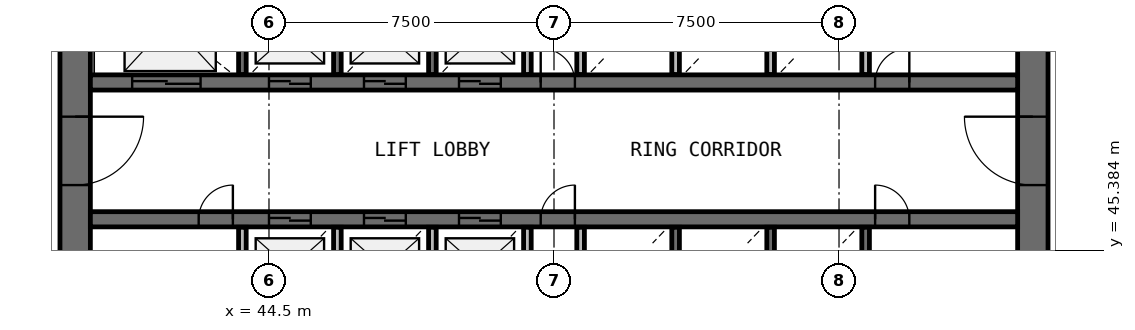
"""IFC4 building model, lengths in metres.
Left out: names, types, materials, properties, quantities, classifications, styles, units other than length and angle.
Written with IfcOpenShell. Run it as: python <this file> out.ifc"""

import sys

from ifc_helpers import new_model, si_unit, direction, frame, frame_2d, origin, place, context, subcontext, project, spatial, rectangle, extrude, source, transform, mapped, element, fill, save


model = new_model("IFC4")
c1 = context("Model", 3, precision=1e-05, world=origin(), true_north=direction((0.0, 1.0)))
c2 = subcontext(c1, "Body", "Model", "MODEL_VIEW")
j1 = project(units=[si_unit("LENGTHUNIT", "METRE"), si_unit("PLANEANGLEUNIT", "RADIAN")], contexts=[c1])
p1 = place(None, origin())
s1 = spatial("IfcSite", under=j1, at=p1, CompositionType="ELEMENT")
p2 = place(p1, origin())
s2 = spatial("IfcBuilding", under=s1, at=p2, CompositionType="ELEMENT")
p3 = place(p2, frame((0.0, 0.0, 108.5)))
s3 = spatial("IfcBuildingStorey", under=s2, at=p3, CompositionType="ELEMENT", Elevation=108.5)
p4 = place(p3, frame((64.6, 38.0, 0.0), z_axis=(0.0, 0.0, 1.0), x_axis=(0.0, 1.0, 0.0)))
e1 = element("IfcWall", 1, at=p4, inside=s3, PredefinedType="SHEAR", context=c2, shape_type="SweptSolid", body=[
    extrude(rectangle(XDim=20.0, YDim=0.8, at=frame_2d((10.0, 0.0))), origin(), (0.0, 0.0, 1.0), 4.1),
])
p5 = place(p4, frame((9.1, 0.0, 0.0)))
e2 = element("IfcOpeningElement", 2, at=p5, cuts=e1, PredefinedType="OPENING", context=c2, shape_type="SweptSolid", body=[
    extrude(rectangle(XDim=1.8, YDim=2.1, at=frame_2d((0.9, 1.05))), frame((0.0, 0.41, 0.0), z_axis=(0.0, -1.0, 0.0), x_axis=(1.0, 0.0, 0.0)), (0.0, 0.0, 1.0), 0.82),
])
p6 = place(p3, frame((39.4, 58.0, 0.0), z_axis=(0.0, 0.0, 1.0), x_axis=(0.0, -1.0, 0.0)))
e3 = element("IfcWall", 3, at=p6, inside=s3, PredefinedType="SHEAR", context=c2, shape_type="SweptSolid", body=[
    extrude(rectangle(XDim=20.0, YDim=0.8, at=frame_2d((10.0, 0.0))), origin(), (0.0, 0.0, 1.0), 4.1),
])
p7 = place(p6, frame((9.1, 0.0, 0.0)))
e4 = element("IfcOpeningElement", 4, at=p7, cuts=e3, PredefinedType="OPENING", context=c2, shape_type="SweptSolid", body=[
    extrude(rectangle(XDim=1.8, YDim=2.1, at=frame_2d((0.9, 1.05))), frame((0.0, 0.41, 0.0), z_axis=(0.0, -1.0, 0.0), x_axis=(1.0, 0.0, 0.0)), (0.0, 0.0, 1.0), 0.82),
])
p8 = place(p3, frame((39.8, 49.8, 0.0), z_axis=(0.0, 0.0, 1.0), x_axis=(1.0, 0.0, 0.0)))
e5 = element("IfcWall", 5, at=p8, inside=s3, PredefinedType="SHEAR", context=c2, shape_type="SweptSolid", body=[
    extrude(rectangle(XDim=24.4, YDim=0.4, at=frame_2d((12.2, 0.0))), origin(), (0.0, 0.0, 1.0), 4.1),
])
p9 = place(p8, frame((4.7, 0.0, 0.0)))
e6 = element("IfcOpeningElement", 6, at=p9, cuts=e5, PredefinedType="OPENING", context=c2, shape_type="SweptSolid", body=[
    extrude(rectangle(XDim=1.1, YDim=2.1, at=frame_2d((0.55, 1.05))), frame((0.0, 0.21, 0.0), z_axis=(0.0, -1.0, 0.0), x_axis=(1.0, 0.0, 0.0)), (0.0, 0.0, 1.0), 0.42),
])
p10 = place(p8, frame((7.2, 0.0, 0.0)))
e7 = element("IfcOpeningElement", 7, at=p10, cuts=e5, PredefinedType="OPENING", context=c2, shape_type="SweptSolid", body=[
    extrude(rectangle(XDim=1.1, YDim=2.1, at=frame_2d((0.55, 1.05))), frame((0.0, 0.21, 0.0), z_axis=(0.0, -1.0, 0.0), x_axis=(1.0, 0.0, 0.0)), (0.0, 0.0, 1.0), 0.42),
])
p11 = place(p8, frame((9.7, 0.0, 0.0)))
e8 = element("IfcOpeningElement", 8, at=p11, cuts=e5, PredefinedType="OPENING", context=c2, shape_type="SweptSolid", body=[
    extrude(rectangle(XDim=1.1, YDim=2.1, at=frame_2d((0.55, 1.05))), frame((0.0, 0.21, 0.0), z_axis=(0.0, -1.0, 0.0), x_axis=(1.0, 0.0, 0.0)), (0.0, 0.0, 1.0), 0.42),
])
p12 = place(p8, frame((1.1, 0.0, 0.0)))
e9 = element("IfcOpeningElement", 9, at=p12, cuts=e5, PredefinedType="OPENING", context=c2, shape_type="SweptSolid", body=[
    extrude(rectangle(XDim=1.8, YDim=2.4, at=frame_2d((0.9, 1.2))), frame((0.0, 0.21, 0.0), z_axis=(0.0, -1.0, 0.0), x_axis=(1.0, 0.0, 0.0)), (0.0, 0.0, 1.0), 0.42),
])
p13 = place(p8, frame((20.65, 0.0, 0.0)))
e10 = element("IfcOpeningElement", 10, at=p13, cuts=e5, PredefinedType="OPENING", context=c2, shape_type="SweptSolid", body=[
    extrude(rectangle(XDim=0.9, YDim=2.1, at=frame_2d((0.45, 1.05))), frame((0.0, 0.21, 0.0), z_axis=(0.0, -1.0, 0.0), x_axis=(1.0, 0.0, 0.0)), (0.0, 0.0, 1.0), 0.42),
])
p14 = place(p8, frame((11.85, 0.0, 0.0)))
e11 = element("IfcOpeningElement", 11, at=p14, cuts=e5, PredefinedType="OPENING", context=c2, shape_type="SweptSolid", body=[
    extrude(rectangle(XDim=0.9, YDim=2.1, at=frame_2d((0.45, 1.05))), frame((0.0, 0.21, 0.0), z_axis=(0.0, -1.0, 0.0), x_axis=(1.0, 0.0, 0.0)), (0.0, 0.0, 1.0), 0.42),
])
p15 = place(p3, frame((39.8, 46.2, 0.0), z_axis=(0.0, 0.0, 1.0), x_axis=(1.0, 0.0, 0.0)))
e12 = element("IfcWall", 12, at=p15, inside=s3, PredefinedType="SHEAR", context=c2, shape_type="SweptSolid", body=[
    extrude(rectangle(XDim=24.4, YDim=0.4, at=frame_2d((12.2, 0.0))), origin(), (0.0, 0.0, 1.0), 4.1),
])
p16 = place(p15, frame((4.7, 0.0, 0.0)))
e13 = element("IfcOpeningElement", 13, at=p16, cuts=e12, PredefinedType="OPENING", context=c2, shape_type="SweptSolid", body=[
    extrude(rectangle(XDim=1.1, YDim=2.1, at=frame_2d((0.55, 1.05))), frame((0.0, 0.21, 0.0), z_axis=(0.0, -1.0, 0.0), x_axis=(1.0, 0.0, 0.0)), (0.0, 0.0, 1.0), 0.42),
])
p17 = place(p15, frame((7.2, 0.0, 0.0)))
e14 = element("IfcOpeningElement", 14, at=p17, cuts=e12, PredefinedType="OPENING", context=c2, shape_type="SweptSolid", body=[
    extrude(rectangle(XDim=1.1, YDim=2.1, at=frame_2d((0.55, 1.05))), frame((0.0, 0.21, 0.0), z_axis=(0.0, -1.0, 0.0), x_axis=(1.0, 0.0, 0.0)), (0.0, 0.0, 1.0), 0.42),
])
p18 = place(p15, frame((9.7, 0.0, 0.0)))
e15 = element("IfcOpeningElement", 15, at=p18, cuts=e12, PredefinedType="OPENING", context=c2, shape_type="SweptSolid", body=[
    extrude(rectangle(XDim=1.1, YDim=2.1, at=frame_2d((0.55, 1.05))), frame((0.0, 0.21, 0.0), z_axis=(0.0, -1.0, 0.0), x_axis=(1.0, 0.0, 0.0)), (0.0, 0.0, 1.0), 0.42),
])
p19 = place(p15, frame((20.65, 0.0, 0.0)))
e16 = element("IfcOpeningElement", 16, at=p19, cuts=e12, PredefinedType="OPENING", context=c2, shape_type="SweptSolid", body=[
    extrude(rectangle(XDim=0.9, YDim=2.1, at=frame_2d((0.45, 1.05))), frame((0.0, 0.21, 0.0), z_axis=(0.0, -1.0, 0.0), x_axis=(1.0, 0.0, 0.0)), (0.0, 0.0, 1.0), 0.42),
])
p20 = place(p15, frame((2.85, 0.0, 0.0)))
e17 = element("IfcOpeningElement", 17, at=p20, cuts=e12, PredefinedType="OPENING", context=c2, shape_type="SweptSolid", body=[
    extrude(rectangle(XDim=0.9, YDim=2.1, at=frame_2d((0.45, 1.05))), frame((0.0, 0.21, 0.0), z_axis=(0.0, -1.0, 0.0), x_axis=(1.0, 0.0, 0.0)), (0.0, 0.0, 1.0), 0.42),
])
p21 = place(p15, frame((11.85, 0.0, 0.0)))
e18 = element("IfcOpeningElement", 18, at=p21, cuts=e12, PredefinedType="OPENING", context=c2, shape_type="SweptSolid", body=[
    extrude(rectangle(XDim=0.9, YDim=2.1, at=frame_2d((0.45, 1.05))), frame((0.0, 0.21, 0.0), z_axis=(0.0, -1.0, 0.0), x_axis=(1.0, 0.0, 0.0)), (0.0, 0.0, 1.0), 0.42),
])
for number, where, z_axis, x_axis in (
    (19, (43.8, 45.99, 0.0), (0.0, 0.0, 1.0), (0.0, -1.0, 0.0)),
    (20, (43.8, 52.37, 0.0), (0.0, 0.0, 1.0), (0.0, -1.0, 0.0)),
):
    element("IfcWall", number, at=place(p3, frame(where, z_axis=z_axis, x_axis=x_axis)), inside=s3, PredefinedType="SOLIDWALL", context=c2, shape_type="SweptSolid", body=[
        extrude(rectangle(XDim=2.36, YDim=0.2, at=frame_2d((1.18, 0.0))), origin(), (0.0, 0.0, 1.0), 3.7),
    ])
p22 = place(p3, frame((46.3, 43.6, 0.0), z_axis=(0.0, 0.0, 1.0), x_axis=(0.0, 1.0, 0.0)))
e21 = element("IfcWall", 21, at=p22, inside=s3, PredefinedType="SOLIDWALL", context=c2, shape_type="SweptSolid", body=[
    extrude(rectangle(XDim=2.39, YDim=0.2, at=frame_2d((1.195, 0.0))), origin(), (0.0, 0.0, 1.0), 3.7),
])
for number, where, z_axis, x_axis in (
    (22, (46.3, 50.01, 0.0), (0.0, 0.0, 1.0), (0.0, 1.0, 0.0)),
    (23, (48.8, 43.63, 0.0), (0.0, 0.0, 1.0), (0.0, 1.0, 0.0)),
    (24, (48.8, 50.01, 0.0), (0.0, 0.0, 1.0), (0.0, 1.0, 0.0)),
    (25, (51.3, 43.63, 0.0), (0.0, 0.0, 1.0), (0.0, 1.0, 0.0)),
):
    element("IfcWall", number, at=place(p3, frame(where, z_axis=z_axis, x_axis=x_axis)), inside=s3, PredefinedType="SOLIDWALL", context=c2, shape_type="SweptSolid", body=[
        extrude(rectangle(XDim=2.36, YDim=0.2, at=frame_2d((1.18, 0.0))), origin(), (0.0, 0.0, 1.0), 3.7),
    ])
for number, where, z_axis, x_axis in (
    (26, (51.3, 50.01, 0.0), (0.0, 0.0, 1.0), (0.0, 1.0, 0.0)),
    (27, (52.7, 45.99, 0.0), (0.0, 0.0, 1.0), (0.0, -1.0, 0.0)),
):
    element("IfcWall", number, at=place(p3, frame(where, z_axis=z_axis, x_axis=x_axis)), inside=s3, PredefinedType="SOLIDWALL", context=c2, shape_type="SweptSolid", body=[
        extrude(rectangle(XDim=2.39, YDim=0.2, at=frame_2d((1.195, 0.0))), origin(), (0.0, 0.0, 1.0), 3.7),
    ])
for number, where, z_axis, x_axis in (
    (28, (52.7, 52.37, 0.0), (0.0, 0.0, 1.0), (0.0, -1.0, 0.0)),
    (29, (55.2, 43.63, 0.0), (0.0, 0.0, 1.0), (0.0, 1.0, 0.0)),
    (30, (55.2, 50.01, 0.0), (0.0, 0.0, 1.0), (0.0, 1.0, 0.0)),
    (31, (57.7, 43.63, 0.0), (0.0, 0.0, 1.0), (0.0, 1.0, 0.0)),
):
    element("IfcWall", number, at=place(p3, frame(where, z_axis=z_axis, x_axis=x_axis)), inside=s3, PredefinedType="SOLIDWALL", context=c2, shape_type="SweptSolid", body=[
        extrude(rectangle(XDim=2.36, YDim=0.2, at=frame_2d((1.18, 0.0))), origin(), (0.0, 0.0, 1.0), 3.7),
    ])
p23 = place(p3, frame((57.7, 50.01, 0.0), z_axis=(0.0, 0.0, 1.0), x_axis=(0.0, 1.0, 0.0)))
e32 = element("IfcWall", 32, at=p23, inside=s3, PredefinedType="SOLIDWALL", context=c2, shape_type="SweptSolid", body=[
    extrude(rectangle(XDim=2.39, YDim=0.2, at=frame_2d((1.195, 0.0))), origin(), (0.0, 0.0, 1.0), 3.7),
])
for number, where, z_axis, x_axis in (
    (33, (60.2, 43.63, 0.0), (0.0, 0.0, 1.0), (0.0, 1.0, 0.0)),
    (34, (60.2, 50.01, 0.0), (0.0, 0.0, 1.0), (0.0, 1.0, 0.0)),
):
    element("IfcWall", number, at=place(p3, frame(where, z_axis=z_axis, x_axis=x_axis)), inside=s3, PredefinedType="SOLIDWALL", context=c2, shape_type="SweptSolid", body=[
        extrude(rectangle(XDim=2.36, YDim=0.2, at=frame_2d((1.18, 0.0))), origin(), (0.0, 0.0, 1.0), 3.7),
    ])
m1 = source(origin(), c2, "Body", "SweptSolid", [
    extrude(rectangle(XDim=1.8, YDim=2.1, at=frame_2d((0.9, 1.05))), frame((0.0, 0.025, 0.0), z_axis=(0.0, -1.0, 0.0), x_axis=(1.0, 0.0, 0.0)), (0.0, 0.0, 1.0), 0.05),
])
p24 = place(p7, origin())
e35 = element("IfcDoor", 35, at=p24, inside=s3, OperationType="SINGLE_SWING_LEFT", PredefinedType="DOOR", context=c2, shape_type="MappedRepresentation", body=[
    mapped(m1, transform((0.0, 0.0, 0.0), scale=1.0)),
])
fill(e4, e35)
p25 = place(p5, origin())
e36 = element("IfcDoor", 36, at=p25, inside=s3, OperationType="SINGLE_SWING_RIGHT", PredefinedType="DOOR", context=c2, shape_type="MappedRepresentation", body=[
    mapped(m1, transform((0.0, 0.0, 0.0), scale=1.0)),
])
fill(e2, e36)
m2 = source(origin(), c2, "Body", "SweptSolid", [
    extrude(rectangle(XDim=1.1, YDim=2.1, at=frame_2d((0.55, 1.05))), frame((0.0, 0.025, 0.0), z_axis=(0.0, -1.0, 0.0), x_axis=(1.0, 0.0, 0.0)), (0.0, 0.0, 1.0), 0.05),
])
p26 = place(p9, origin())
e37 = element("IfcDoor", 37, at=p26, inside=s3, OperationType="DOUBLE_DOOR_SLIDING", PredefinedType="USERDEFINED", context=c2, shape_type="MappedRepresentation", body=[
    mapped(m2, transform((0.0, 0.0, 0.0), scale=1.0)),
])
fill(e6, e37)
p27 = place(p10, origin())
e38 = element("IfcDoor", 38, at=p27, inside=s3, OperationType="DOUBLE_DOOR_SLIDING", PredefinedType="USERDEFINED", context=c2, shape_type="MappedRepresentation", body=[
    mapped(m2, transform((0.0, 0.0, 0.0), scale=1.0)),
])
fill(e7, e38)
p28 = place(p11, origin())
e39 = element("IfcDoor", 39, at=p28, inside=s3, OperationType="DOUBLE_DOOR_SLIDING", PredefinedType="USERDEFINED", context=c2, shape_type="MappedRepresentation", body=[
    mapped(m2, transform((0.0, 0.0, 0.0), scale=1.0)),
])
fill(e8, e39)
p29 = place(p16, origin())
e40 = element("IfcDoor", 40, at=p29, inside=s3, OperationType="DOUBLE_DOOR_SLIDING", PredefinedType="USERDEFINED", context=c2, shape_type="MappedRepresentation", body=[
    mapped(m2, transform((0.0, 0.0, 0.0), scale=1.0)),
])
fill(e13, e40)
p30 = place(p17, origin())
e41 = element("IfcDoor", 41, at=p30, inside=s3, OperationType="DOUBLE_DOOR_SLIDING", PredefinedType="USERDEFINED", context=c2, shape_type="MappedRepresentation", body=[
    mapped(m2, transform((0.0, 0.0, 0.0), scale=1.0)),
])
fill(e14, e41)
p31 = place(p18, origin())
e42 = element("IfcDoor", 42, at=p31, inside=s3, OperationType="DOUBLE_DOOR_SLIDING", PredefinedType="USERDEFINED", context=c2, shape_type="MappedRepresentation", body=[
    mapped(m2, transform((0.0, 0.0, 0.0), scale=1.0)),
])
fill(e15, e42)
m3 = source(origin(), c2, "Body", "SweptSolid", [
    extrude(rectangle(XDim=1.8, YDim=2.4, at=frame_2d((0.9, 1.2))), frame((0.0, 0.025, 0.0), z_axis=(0.0, -1.0, 0.0), x_axis=(1.0, 0.0, 0.0)), (0.0, 0.0, 1.0), 0.05),
])
p32 = place(p12, origin())
e43 = element("IfcDoor", 43, at=p32, inside=s3, OperationType="DOUBLE_DOOR_SLIDING", PredefinedType="USERDEFINED", context=c2, shape_type="MappedRepresentation", body=[
    mapped(m3, transform((0.0, 0.0, 0.0), scale=1.0)),
])
fill(e9, e43)
m4 = source(origin(), c2, "Body", "SweptSolid", [
    extrude(rectangle(XDim=0.9, YDim=2.1, at=frame_2d((0.45, 1.05))), frame((0.0, 0.025, 0.0), z_axis=(0.0, -1.0, 0.0), x_axis=(1.0, 0.0, 0.0)), (0.0, 0.0, 1.0), 0.05),
])
p33 = place(p19, origin())
e44 = element("IfcDoor", 44, at=p33, inside=s3, OperationType="SINGLE_SWING_LEFT", PredefinedType="DOOR", context=c2, shape_type="MappedRepresentation", body=[
    mapped(m4, transform((0.0, 0.0, 0.0), scale=1.0)),
])
fill(e16, e44)
p34 = place(p13, origin())
e45 = element("IfcDoor", 45, at=p34, inside=s3, OperationType="SINGLE_SWING_RIGHT", PredefinedType="DOOR", context=c2, shape_type="MappedRepresentation", body=[
    mapped(m4, transform((0.0, 0.0, 0.0), scale=1.0)),
])
fill(e10, e45)
p35 = place(p20, origin())
e46 = element("IfcDoor", 46, at=p35, inside=s3, OperationType="SINGLE_SWING_RIGHT", PredefinedType="DOOR", context=c2, shape_type="MappedRepresentation", body=[
    mapped(m4, transform((0.0, 0.0, 0.0), scale=1.0)),
])
fill(e17, e46)
p36 = place(p14, origin())
e47 = element("IfcDoor", 47, at=p36, inside=s3, OperationType="SINGLE_SWING_LEFT", PredefinedType="DOOR", context=c2, shape_type="MappedRepresentation", body=[
    mapped(m4, transform((0.0, 0.0, 0.0), scale=1.0)),
])
fill(e11, e47)
p37 = place(p21, origin())
e48 = element("IfcDoor", 48, at=p37, inside=s3, OperationType="SINGLE_SWING_RIGHT", PredefinedType="DOOR", context=c2, shape_type="MappedRepresentation", body=[
    mapped(m4, transform((0.0, 0.0, 0.0), scale=1.0)),
])
fill(e18, e48)
save(model, sys.argv[1])
